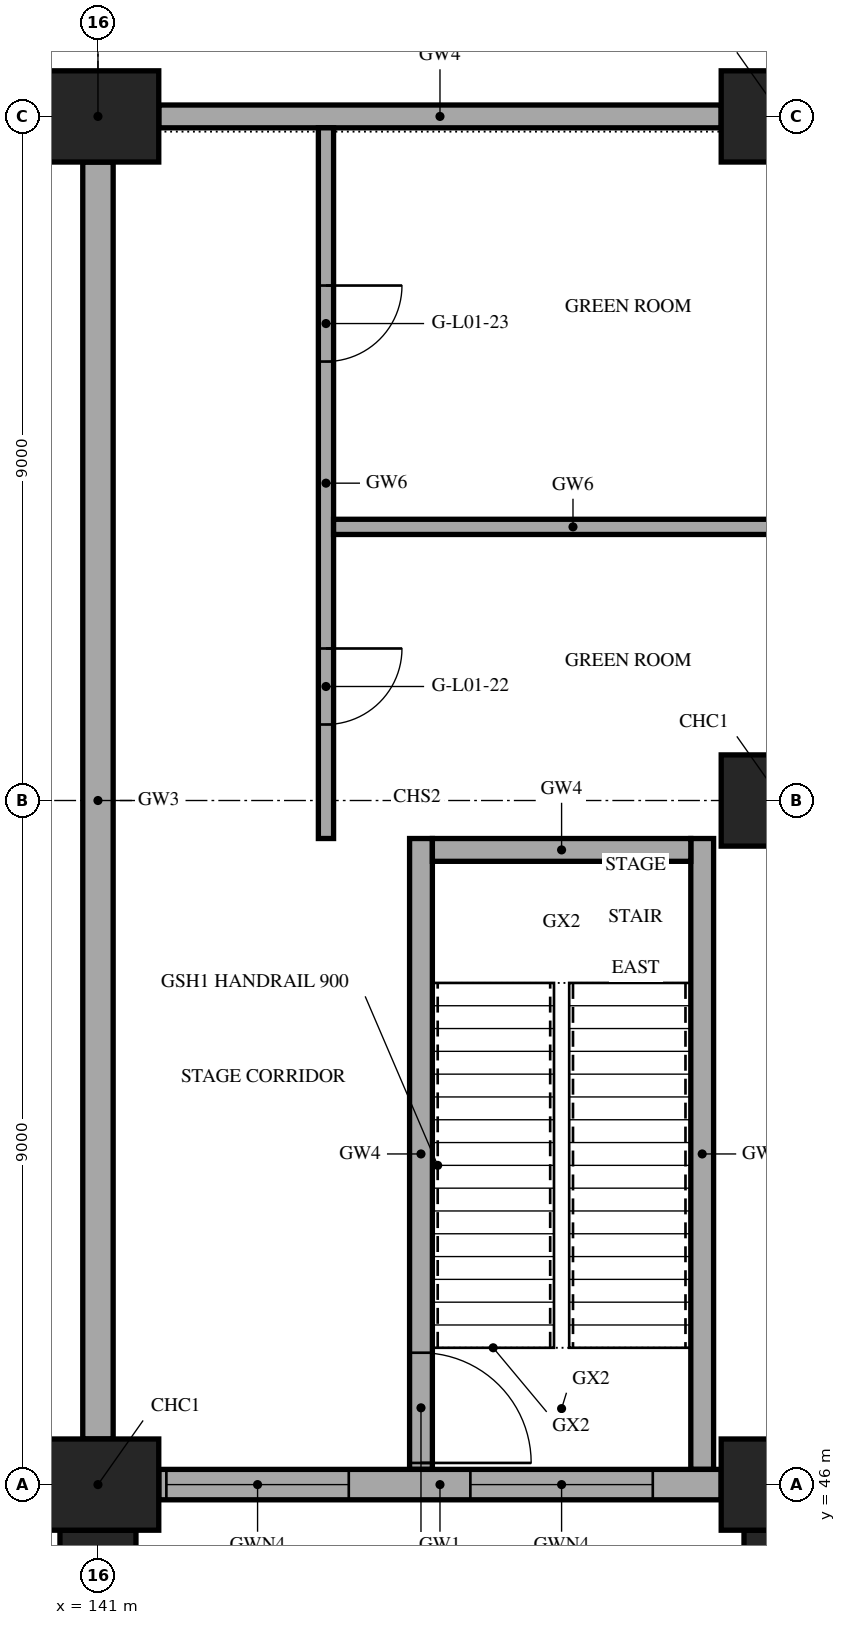
"""IFC4 building model, lengths in metres.
Left out: names, types, materials, properties, quantities, classifications, styles, units other than length and angle.
Written with IfcOpenShell. Run it as: python <this file> out.ifc"""

import sys

from ifc_helpers import new_model, si_unit, direction, frame, frame_2d, origin, origin_2d, place, context, subcontext, project, spatial, rectangle, extrude, element, fill, save


model = new_model("IFC4")
c1 = context("Model", 3, precision=1e-05, world=origin(), true_north=direction((0.0, 1.0)))
c2 = subcontext(c1, "Body", "Model", "MODEL_VIEW")
j1 = project(units=[si_unit("LENGTHUNIT", "METRE"), si_unit("PLANEANGLEUNIT", "RADIAN")], contexts=[c1])
p1 = place(None, origin())
s1 = spatial("IfcSite", under=j1, at=p1, CompositionType="ELEMENT")
p2 = place(p1, origin())
s2 = spatial("IfcBuilding", under=s1, at=p2, CompositionType="ELEMENT")
p3 = place(p2, frame((0.0, 0.0, 5.0)))
s3 = spatial("IfcBuildingStorey", under=s2, at=p3, CompositionType="ELEMENT", Elevation=5.0)
for number, where, z_axis, x_axis in (
    (1, (141.0, 44.9, 0.0), (0.0, 0.0, 1.0), (1.0, 0.0, 0.0)),
    (2, (150.0, 44.9, 0.0), (0.0, 0.0, 1.0), (1.0, 0.0, 0.0)),
):
    element("IfcColumn", number, at=place(p3, frame(where, z_axis=z_axis, x_axis=x_axis)), inside=s3, PredefinedType="COLUMN", context=c2, shape_type="SweptSolid", body=[
        extrude(rectangle(XDim=1.0, YDim=1.0, at=origin_2d()), origin(), (0.0, 0.0, 1.0), 5.0),
    ])
for number, where, z_axis, x_axis in (
    (3, (141.0, 46.0, 0.0), (0.0, 0.0, 1.0), (1.0, 0.0, 0.0)),
    (4, (150.0, 46.0, 0.0), (0.0, 0.0, 1.0), (1.0, 0.0, 0.0)),
    (5, (150.0, 55.0, 0.0), (0.0, 0.0, 1.0), (1.0, 0.0, 0.0)),
    (6, (141.0, 64.0, 0.0), (0.0, 0.0, 1.0), (1.0, 0.0, 0.0)),
    (7, (150.0, 64.0, 0.0), (0.0, 0.0, 1.0), (1.0, 0.0, 0.0)),
):
    element("IfcColumn", number, at=place(p3, frame(where, z_axis=z_axis, x_axis=x_axis)), inside=s3, PredefinedType="COLUMN", context=c2, shape_type="SweptSolid", body=[
        extrude(rectangle(XDim=1.6, YDim=1.2, at=origin_2d()), origin(), (0.0, 0.0, 1.0), 5.0),
    ])
p4 = place(p3, frame((141.0, 46.6, 0.0), z_axis=(0.0, 0.0, 1.0), x_axis=(0.0, 1.0, 0.0)))
e8 = element("IfcWall", 8, at=p4, inside=s3, PredefinedType="SHEAR", context=c2, shape_type="SweptSolid", body=[
    extrude(rectangle(XDim=16.8, YDim=0.4, at=frame_2d((8.4, 0.0))), origin(), (0.0, 0.0, 1.0), 5.0),
])
p5 = place(p3, frame((141.8, 64.0, 0.0), z_axis=(0.0, 0.0, 1.0), x_axis=(1.0, 0.0, 0.0)))
e9 = element("IfcWall", 9, at=p5, inside=s3, PredefinedType="SHEAR", context=c2, shape_type="SweptSolid", body=[
    extrude(rectangle(XDim=7.4, YDim=0.3, at=frame_2d((3.7, 0.0))), origin(), (0.0, 0.0, 1.0), 5.0),
])
p6 = place(p3, frame((145.25, 46.2, 0.0), z_axis=(0.0, 0.0, 1.0), x_axis=(0.0, 1.0, 0.0)))
e10 = element("IfcWall", 10, at=p6, inside=s3, PredefinedType="SHEAR", context=c2, shape_type="SweptSolid", body=[
    extrude(rectangle(XDim=8.3, YDim=0.3, at=frame_2d((4.15, 0.0))), origin(), (0.0, 0.0, 1.0), 5.0),
])
p7 = place(p6, frame((0.085, 0.0, 0.0)))
e11 = element("IfcOpeningElement", 11, at=p7, cuts=e10, PredefinedType="OPENING", context=c2, shape_type="SweptSolid", body=[
    extrude(rectangle(XDim=1.45, YDim=2.1, at=frame_2d((0.725, 1.05))), frame((0.0, 0.16, 0.0), z_axis=(0.0, -1.0, 0.0), x_axis=(1.0, 0.0, 0.0)), (0.0, 0.0, 1.0), 0.32),
])
p8 = place(p3, frame((148.95, 46.2, 0.0), z_axis=(0.0, 0.0, 1.0), x_axis=(0.0, 1.0, 0.0)))
e12 = element("IfcWall", 12, at=p8, inside=s3, PredefinedType="SHEAR", context=c2, shape_type="SweptSolid", body=[
    extrude(rectangle(XDim=8.3, YDim=0.3, at=frame_2d((4.15, 0.0))), origin(), (0.0, 0.0, 1.0), 5.0),
])
p9 = place(p3, frame((145.4, 54.35, 0.0), z_axis=(0.0, 0.0, 1.0), x_axis=(1.0, 0.0, 0.0)))
e13 = element("IfcWall", 13, at=p9, inside=s3, PredefinedType="SHEAR", context=c2, shape_type="SweptSolid", body=[
    extrude(rectangle(XDim=3.4, YDim=0.3, at=frame_2d((1.7, 0.0))), origin(), (0.0, 0.0, 1.0), 5.0),
])
p10 = place(p3, frame((141.8, 46.0, 0.0), z_axis=(0.0, 0.0, 1.0), x_axis=(1.0, 0.0, 0.0)))
e14 = element("IfcWall", 14, at=p10, inside=s3, PredefinedType="SOLIDWALL", context=c2, shape_type="SweptSolid", body=[
    extrude(rectangle(XDim=7.4, YDim=0.4, at=frame_2d((3.7, 0.0))), origin(), (0.0, 0.0, 1.0), 5.0),
])
p11 = place(p10, frame((4.1, 0.0, 1.2)))
e15 = element("IfcOpeningElement", 15, at=p11, cuts=e14, PredefinedType="OPENING", context=c2, shape_type="SweptSolid", body=[
    extrude(rectangle(XDim=2.4, YDim=1.8, at=frame_2d((1.2, 0.9))), frame((0.0, 0.21, 0.0), z_axis=(0.0, -1.0, 0.0), x_axis=(1.0, 0.0, 0.0)), (0.0, 0.0, 1.0), 0.42),
])
p12 = place(p10, frame((0.1, 0.0, 1.2)))
e16 = element("IfcOpeningElement", 16, at=p12, cuts=e14, PredefinedType="OPENING", context=c2, shape_type="SweptSolid", body=[
    extrude(rectangle(XDim=2.4, YDim=1.8, at=frame_2d((1.2, 0.9))), frame((0.0, 0.21, 0.0), z_axis=(0.0, -1.0, 0.0), x_axis=(1.0, 0.0, 0.0)), (0.0, 0.0, 1.0), 0.42),
])
p13 = place(p3, frame((144.0, 54.5, 0.0), z_axis=(0.0, 0.0, 1.0), x_axis=(0.0, 1.0, 0.0)))
e17 = element("IfcWall", 17, at=p13, inside=s3, PredefinedType="PARTITIONING", context=c2, shape_type="SweptSolid", body=[
    extrude(rectangle(XDim=9.35, YDim=0.2, at=frame_2d((4.675, 0.0))), origin(), (0.0, 0.0, 1.0), 4.7),
])
p14 = place(p13, frame((1.5, 0.0, 0.0)))
e18 = element("IfcOpeningElement", 18, at=p14, cuts=e17, PredefinedType="OPENING", context=c2, shape_type="SweptSolid", body=[
    extrude(rectangle(XDim=1.0, YDim=2.1, at=frame_2d((0.5, 1.05))), frame((0.0, 0.11, 0.0), z_axis=(0.0, -1.0, 0.0), x_axis=(1.0, 0.0, 0.0)), (0.0, 0.0, 1.0), 0.22),
])
p15 = place(p13, frame((6.275, 0.0, 0.0)))
e19 = element("IfcOpeningElement", 19, at=p15, cuts=e17, PredefinedType="OPENING", context=c2, shape_type="SweptSolid", body=[
    extrude(rectangle(XDim=1.0, YDim=2.1, at=frame_2d((0.5, 1.05))), frame((0.0, 0.11, 0.0), z_axis=(0.0, -1.0, 0.0), x_axis=(1.0, 0.0, 0.0)), (0.0, 0.0, 1.0), 0.22),
])
p16 = place(p3, frame((144.1, 58.6, 0.0), z_axis=(0.0, 0.0, 1.0), x_axis=(1.0, 0.0, 0.0)))
e20 = element("IfcWall", 20, at=p16, inside=s3, PredefinedType="PARTITIONING", context=c2, shape_type="SweptSolid", body=[
    extrude(rectangle(XDim=6.3, YDim=0.2, at=frame_2d((3.15, 0.0))), origin(), (0.0, 0.0, 1.0), 4.7),
])
p17 = place(p11, origin())
e21 = element("IfcWindow", 21, at=p17, inside=s3, PartitioningType="SINGLE_PANEL", PredefinedType="WINDOW", context=c2, shape_type="SweptSolid", body=[
    extrude(rectangle(XDim=2.4, YDim=1.8, at=frame_2d((1.2, 0.9))), frame((0.0, 0.03, 0.0), z_axis=(0.0, -1.0, 0.0), x_axis=(1.0, 0.0, 0.0)), (0.0, 0.0, 1.0), 0.06),
])
fill(e15, e21)
p18 = place(p12, origin())
e22 = element("IfcWindow", 22, at=p18, inside=s3, PartitioningType="SINGLE_PANEL", PredefinedType="WINDOW", context=c2, shape_type="SweptSolid", body=[
    extrude(rectangle(XDim=2.4, YDim=1.8, at=frame_2d((1.2, 0.9))), frame((0.0, 0.03, 0.0), z_axis=(0.0, -1.0, 0.0), x_axis=(1.0, 0.0, 0.0)), (0.0, 0.0, 1.0), 0.06),
])
fill(e16, e22)
p19 = place(p7, frame((1.45, 0.0, 0.0), z_axis=(0.0, 0.0, 1.0), x_axis=(-1.0, 0.0, 0.0)))
e23 = element("IfcDoor", 23, at=p19, inside=s3, OperationType="SINGLE_SWING_RIGHT", PredefinedType="DOOR", context=c2, shape_type="SweptSolid", body=[
    extrude(rectangle(XDim=1.45, YDim=2.1, at=frame_2d((0.725, 1.05))), frame((0.0, 0.025, 0.0), z_axis=(0.0, -1.0, 0.0), x_axis=(1.0, 0.0, 0.0)), (0.0, 0.0, 1.0), 0.05),
])
fill(e11, e23)
p20 = place(p14, frame((1.0, 0.0, 0.0), z_axis=(0.0, 0.0, 1.0), x_axis=(-1.0, 0.0, 0.0)))
e24 = element("IfcDoor", 24, at=p20, inside=s3, OperationType="SINGLE_SWING_LEFT", PredefinedType="DOOR", context=c2, shape_type="SweptSolid", body=[
    extrude(rectangle(XDim=1.0, YDim=2.1, at=frame_2d((0.5, 1.05))), frame((0.0, 0.025, 0.0), z_axis=(0.0, -1.0, 0.0), x_axis=(1.0, 0.0, 0.0)), (0.0, 0.0, 1.0), 0.05),
])
fill(e18, e24)
p21 = place(p15, frame((1.0, 0.0, 0.0), z_axis=(0.0, 0.0, 1.0), x_axis=(-1.0, 0.0, 0.0)))
e25 = element("IfcDoor", 25, at=p21, inside=s3, OperationType="SINGLE_SWING_LEFT", PredefinedType="DOOR", context=c2, shape_type="SweptSolid", body=[
    extrude(rectangle(XDim=1.0, YDim=2.1, at=frame_2d((0.5, 1.05))), frame((0.0, 0.025, 0.0), z_axis=(0.0, -1.0, 0.0), x_axis=(1.0, 0.0, 0.0)), (0.0, 0.0, 1.0), 0.05),
])
fill(e19, e25)
save(model, sys.argv[1])
